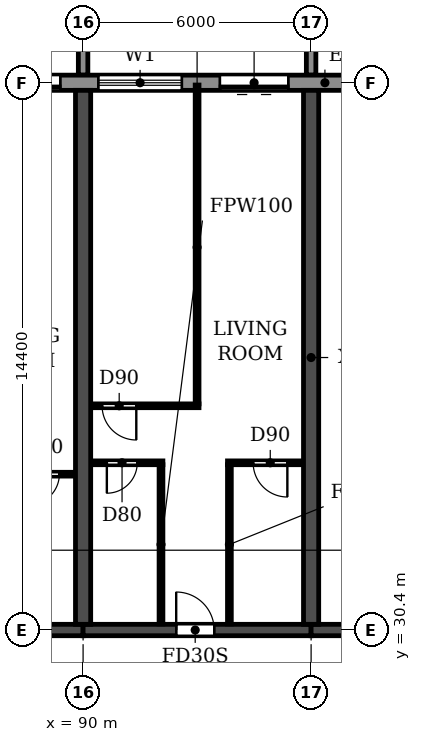
"""IFC4 building model, lengths in metres.
Left out: names, types, materials, properties, quantities, classifications, styles, units other than length and angle.
Written with IfcOpenShell. Run it as: python <this file> out.ifc"""

import sys

from ifc_helpers import new_model, si_unit, direction, frame, frame_2d, origin, place, context, subcontext, project, spatial, polyline, rectangle, outline, extrude, source, transform, mapped, element, fill, save


model = new_model("IFC4")
c1 = context("Model", 3, precision=1e-05, world=origin(), true_north=direction((0.0, 1.0)))
c2 = subcontext(c1, "Body", "Model", "MODEL_VIEW")
j1 = project(units=[si_unit("LENGTHUNIT", "METRE"), si_unit("PLANEANGLEUNIT", "RADIAN")], contexts=[c1])
p1 = place(None, origin())
s1 = spatial("IfcSite", under=j1, at=p1, CompositionType="ELEMENT")
p2 = place(p1, origin())
s2 = spatial("IfcBuilding", under=s1, at=p2, CompositionType="ELEMENT")
p3 = place(p2, frame((0.0, 0.0, 33.3)))
s3 = spatial("IfcBuildingStorey", under=s2, at=p3, CompositionType="ELEMENT", Elevation=33.3)
for number, where, z_axis, x_axis in (
    (1, (90.0, 30.55, 0.0), (0.0, 0.0, 1.0), (0.0, 1.0, 0.0)),
    (2, (96.0, 30.55, 0.0), (0.0, 0.0, 1.0), (0.0, 1.0, 0.0)),
):
    element("IfcWall", number, at=place(p3, frame(where, z_axis=z_axis, x_axis=x_axis)), inside=s3, PredefinedType="SHEAR", context=c2, shape_type="SweptSolid", body=[
        extrude(rectangle(XDim=14.05, YDim=0.4, at=frame_2d((7.025, 0.0))), origin(), (0.0, 0.0, 1.0), 3.05),
    ])
p4 = place(p3, frame((84.0, 30.4, 0.0), z_axis=(0.0, 0.0, 1.0), x_axis=(1.0, 0.0, 0.0)))
e3 = element("IfcWall", 3, at=p4, inside=s3, PredefinedType="SHEAR", context=c2, shape_type="SweptSolid", body=[
    extrude(rectangle(XDim=6.0, YDim=0.3, at=frame_2d((3.0, 0.0))), origin(), (0.0, 0.0, 1.0), 2.45),
])
p5 = place(p4, frame((2.55, 0.0, 0.0)))
e4 = element("IfcOpeningElement", 4, at=p5, cuts=e3, PredefinedType="OPENING", context=c2, shape_type="SweptSolid", body=[
    extrude(rectangle(XDim=1.0, YDim=2.1, at=frame_2d((0.5, 1.05))), frame((0.0, 0.16, 0.0), z_axis=(0.0, -1.0, 0.0), x_axis=(1.0, 0.0, 0.0)), (0.0, 0.0, 1.0), 0.32),
])
p6 = place(p3, frame((90.0, 30.4, 0.0), z_axis=(0.0, 0.0, 1.0), x_axis=(1.0, 0.0, 0.0)))
e5 = element("IfcWall", 5, at=p6, inside=s3, PredefinedType="SHEAR", context=c2, shape_type="SweptSolid", body=[
    extrude(rectangle(XDim=6.0, YDim=0.3, at=frame_2d((3.0, 0.0))), origin(), (0.0, 0.0, 1.0), 2.45),
])
p7 = place(p6, frame((2.45, 0.0, 0.0)))
e6 = element("IfcOpeningElement", 6, at=p7, cuts=e5, PredefinedType="OPENING", context=c2, shape_type="SweptSolid", body=[
    extrude(rectangle(XDim=1.0, YDim=2.1, at=frame_2d((0.5, 1.05))), frame((0.0, 0.16, 0.0), z_axis=(0.0, -1.0, 0.0), x_axis=(1.0, 0.0, 0.0)), (0.0, 0.0, 1.0), 0.32),
])
p8 = place(p3, frame((96.0, 30.4, 0.0), z_axis=(0.0, 0.0, 1.0), x_axis=(1.0, 0.0, 0.0)))
e7 = element("IfcWall", 7, at=p8, inside=s3, PredefinedType="SHEAR", context=c2, shape_type="SweptSolid", body=[
    extrude(rectangle(XDim=5.8, YDim=0.3, at=frame_2d((2.9, 0.0))), origin(), (0.0, 0.0, 1.0), 2.45),
])
p9 = place(p8, frame((2.5, 0.0, 0.0)))
e8 = element("IfcOpeningElement", 8, at=p9, cuts=e7, PredefinedType="OPENING", context=c2, shape_type="SweptSolid", body=[
    extrude(rectangle(XDim=1.0, YDim=2.1, at=frame_2d((0.5, 1.05))), frame((0.0, 0.16, 0.0), z_axis=(0.0, -1.0, 0.0), x_axis=(1.0, 0.0, 0.0)), (0.0, 0.0, 1.0), 0.32),
])
p10 = place(p3, frame((97.317, 44.8, 0.0), z_axis=(0.0, 0.0, 1.0), x_axis=(-1.0, 0.0, 0.0)))
e9 = element("IfcWall", 9, at=p10, inside=s3, PredefinedType="STANDARD", context=c2, shape_type="SweptSolid", body=[
    extrude(rectangle(XDim=92.634, YDim=0.4, at=frame_2d((46.317, 0.0))), origin(), (0.0, 0.0, 1.0), 3.05),
])
p11 = place(p10, frame((88.717, 0.0, 0.9)))
e10 = element("IfcOpeningElement", 10, at=p11, cuts=e9, PredefinedType="OPENING", context=c2, shape_type="SweptSolid", body=[
    extrude(rectangle(XDim=2.2, YDim=1.5, at=frame_2d((1.1, 0.75))), frame((0.0, 0.21, 0.0), z_axis=(0.0, -1.0, 0.0), x_axis=(1.0, 0.0, 0.0)), (0.0, 0.0, 1.0), 0.42),
])
p12 = place(p10, frame((85.917, 0.0, 0.0)))
e11 = element("IfcOpeningElement", 11, at=p12, cuts=e9, PredefinedType="OPENING", context=c2, shape_type="SweptSolid", body=[
    extrude(rectangle(XDim=1.8, YDim=2.4, at=frame_2d((0.9, 1.2))), frame((0.0, 0.21, 0.0), z_axis=(0.0, -1.0, 0.0), x_axis=(1.0, 0.0, 0.0)), (0.0, 0.0, 1.0), 0.42),
])
p13 = place(p10, frame((82.717, 0.0, 0.9)))
e12 = element("IfcOpeningElement", 12, at=p13, cuts=e9, PredefinedType="OPENING", context=c2, shape_type="SweptSolid", body=[
    extrude(rectangle(XDim=2.2, YDim=1.5, at=frame_2d((1.1, 0.75))), frame((0.0, 0.21, 0.0), z_axis=(0.0, -1.0, 0.0), x_axis=(1.0, 0.0, 0.0)), (0.0, 0.0, 1.0), 0.42),
])
p14 = place(p10, frame((79.917, 0.0, 0.0)))
e13 = element("IfcOpeningElement", 13, at=p14, cuts=e9, PredefinedType="OPENING", context=c2, shape_type="SweptSolid", body=[
    extrude(rectangle(XDim=1.8, YDim=2.4, at=frame_2d((0.9, 1.2))), frame((0.0, 0.21, 0.0), z_axis=(0.0, -1.0, 0.0), x_axis=(1.0, 0.0, 0.0)), (0.0, 0.0, 1.0), 0.42),
])
p15 = place(p10, frame((76.717, 0.0, 0.9)))
e14 = element("IfcOpeningElement", 14, at=p15, cuts=e9, PredefinedType="OPENING", context=c2, shape_type="SweptSolid", body=[
    extrude(rectangle(XDim=2.2, YDim=1.5, at=frame_2d((1.1, 0.75))), frame((0.0, 0.21, 0.0), z_axis=(0.0, -1.0, 0.0), x_axis=(1.0, 0.0, 0.0)), (0.0, 0.0, 1.0), 0.42),
])
p16 = place(p10, frame((73.717, 0.0, 0.9)))
e15 = element("IfcOpeningElement", 15, at=p16, cuts=e9, PredefinedType="OPENING", context=c2, shape_type="SweptSolid", body=[
    extrude(rectangle(XDim=2.2, YDim=1.5, at=frame_2d((1.1, 0.75))), frame((0.0, 0.21, 0.0), z_axis=(0.0, -1.0, 0.0), x_axis=(1.0, 0.0, 0.0)), (0.0, 0.0, 1.0), 0.42),
])
p17 = place(p10, frame((70.717, 0.0, 0.9)))
e16 = element("IfcOpeningElement", 16, at=p17, cuts=e9, PredefinedType="OPENING", context=c2, shape_type="SweptSolid", body=[
    extrude(rectangle(XDim=2.2, YDim=1.5, at=frame_2d((1.1, 0.75))), frame((0.0, 0.21, 0.0), z_axis=(0.0, -1.0, 0.0), x_axis=(1.0, 0.0, 0.0)), (0.0, 0.0, 1.0), 0.42),
])
p18 = place(p10, frame((67.917, 0.0, 0.0)))
e17 = element("IfcOpeningElement", 17, at=p18, cuts=e9, PredefinedType="OPENING", context=c2, shape_type="SweptSolid", body=[
    extrude(rectangle(XDim=1.8, YDim=2.4, at=frame_2d((0.9, 1.2))), frame((0.0, 0.21, 0.0), z_axis=(0.0, -1.0, 0.0), x_axis=(1.0, 0.0, 0.0)), (0.0, 0.0, 1.0), 0.42),
])
p19 = place(p10, frame((64.717, 0.0, 0.9)))
e18 = element("IfcOpeningElement", 18, at=p19, cuts=e9, PredefinedType="OPENING", context=c2, shape_type="SweptSolid", body=[
    extrude(rectangle(XDim=2.2, YDim=1.5, at=frame_2d((1.1, 0.75))), frame((0.0, 0.21, 0.0), z_axis=(0.0, -1.0, 0.0), x_axis=(1.0, 0.0, 0.0)), (0.0, 0.0, 1.0), 0.42),
])
p20 = place(p10, frame((61.717, 0.0, 0.9)))
e19 = element("IfcOpeningElement", 19, at=p20, cuts=e9, PredefinedType="OPENING", context=c2, shape_type="SweptSolid", body=[
    extrude(rectangle(XDim=2.2, YDim=1.5, at=frame_2d((1.1, 0.75))), frame((0.0, 0.21, 0.0), z_axis=(0.0, -1.0, 0.0), x_axis=(1.0, 0.0, 0.0)), (0.0, 0.0, 1.0), 0.42),
])
p21 = place(p10, frame((58.717, 0.0, 0.9)))
e20 = element("IfcOpeningElement", 20, at=p21, cuts=e9, PredefinedType="OPENING", context=c2, shape_type="SweptSolid", body=[
    extrude(rectangle(XDim=2.2, YDim=1.5, at=frame_2d((1.1, 0.75))), frame((0.0, 0.21, 0.0), z_axis=(0.0, -1.0, 0.0), x_axis=(1.0, 0.0, 0.0)), (0.0, 0.0, 1.0), 0.42),
])
p22 = place(p10, frame((55.917, 0.0, 0.0)))
e21 = element("IfcOpeningElement", 21, at=p22, cuts=e9, PredefinedType="OPENING", context=c2, shape_type="SweptSolid", body=[
    extrude(rectangle(XDim=1.8, YDim=2.4, at=frame_2d((0.9, 1.2))), frame((0.0, 0.21, 0.0), z_axis=(0.0, -1.0, 0.0), x_axis=(1.0, 0.0, 0.0)), (0.0, 0.0, 1.0), 0.42),
])
p23 = place(p10, frame((52.717, 0.0, 0.9)))
e22 = element("IfcOpeningElement", 22, at=p23, cuts=e9, PredefinedType="OPENING", context=c2, shape_type="SweptSolid", body=[
    extrude(rectangle(XDim=2.2, YDim=1.5, at=frame_2d((1.1, 0.75))), frame((0.0, 0.21, 0.0), z_axis=(0.0, -1.0, 0.0), x_axis=(1.0, 0.0, 0.0)), (0.0, 0.0, 1.0), 0.42),
])
p24 = place(p10, frame((49.717, 0.0, 0.9)))
e23 = element("IfcOpeningElement", 23, at=p24, cuts=e9, PredefinedType="OPENING", context=c2, shape_type="SweptSolid", body=[
    extrude(rectangle(XDim=2.2, YDim=1.5, at=frame_2d((1.1, 0.75))), frame((0.0, 0.21, 0.0), z_axis=(0.0, -1.0, 0.0), x_axis=(1.0, 0.0, 0.0)), (0.0, 0.0, 1.0), 0.42),
])
p25 = place(p10, frame((46.717, 0.0, 0.9)))
e24 = element("IfcOpeningElement", 24, at=p25, cuts=e9, PredefinedType="OPENING", context=c2, shape_type="SweptSolid", body=[
    extrude(rectangle(XDim=2.2, YDim=1.5, at=frame_2d((1.1, 0.75))), frame((0.0, 0.21, 0.0), z_axis=(0.0, -1.0, 0.0), x_axis=(1.0, 0.0, 0.0)), (0.0, 0.0, 1.0), 0.42),
])
p26 = place(p10, frame((43.917, 0.0, 0.0)))
e25 = element("IfcOpeningElement", 25, at=p26, cuts=e9, PredefinedType="OPENING", context=c2, shape_type="SweptSolid", body=[
    extrude(rectangle(XDim=1.8, YDim=2.4, at=frame_2d((0.9, 1.2))), frame((0.0, 0.21, 0.0), z_axis=(0.0, -1.0, 0.0), x_axis=(1.0, 0.0, 0.0)), (0.0, 0.0, 1.0), 0.42),
])
p27 = place(p10, frame((40.717, 0.0, 0.9)))
e26 = element("IfcOpeningElement", 26, at=p27, cuts=e9, PredefinedType="OPENING", context=c2, shape_type="SweptSolid", body=[
    extrude(rectangle(XDim=2.2, YDim=1.5, at=frame_2d((1.1, 0.75))), frame((0.0, 0.21, 0.0), z_axis=(0.0, -1.0, 0.0), x_axis=(1.0, 0.0, 0.0)), (0.0, 0.0, 1.0), 0.42),
])
p28 = place(p10, frame((37.717, 0.0, 0.9)))
e27 = element("IfcOpeningElement", 27, at=p28, cuts=e9, PredefinedType="OPENING", context=c2, shape_type="SweptSolid", body=[
    extrude(rectangle(XDim=2.2, YDim=1.5, at=frame_2d((1.1, 0.75))), frame((0.0, 0.21, 0.0), z_axis=(0.0, -1.0, 0.0), x_axis=(1.0, 0.0, 0.0)), (0.0, 0.0, 1.0), 0.42),
])
p29 = place(p10, frame((34.717, 0.0, 0.9)))
e28 = element("IfcOpeningElement", 28, at=p29, cuts=e9, PredefinedType="OPENING", context=c2, shape_type="SweptSolid", body=[
    extrude(rectangle(XDim=2.2, YDim=1.5, at=frame_2d((1.1, 0.75))), frame((0.0, 0.21, 0.0), z_axis=(0.0, -1.0, 0.0), x_axis=(1.0, 0.0, 0.0)), (0.0, 0.0, 1.0), 0.42),
])
p30 = place(p10, frame((31.917, 0.0, 0.0)))
e29 = element("IfcOpeningElement", 29, at=p30, cuts=e9, PredefinedType="OPENING", context=c2, shape_type="SweptSolid", body=[
    extrude(rectangle(XDim=1.8, YDim=2.4, at=frame_2d((0.9, 1.2))), frame((0.0, 0.21, 0.0), z_axis=(0.0, -1.0, 0.0), x_axis=(1.0, 0.0, 0.0)), (0.0, 0.0, 1.0), 0.42),
])
p31 = place(p10, frame((28.717, 0.0, 0.9)))
e30 = element("IfcOpeningElement", 30, at=p31, cuts=e9, PredefinedType="OPENING", context=c2, shape_type="SweptSolid", body=[
    extrude(rectangle(XDim=2.2, YDim=1.5, at=frame_2d((1.1, 0.75))), frame((0.0, 0.21, 0.0), z_axis=(0.0, -1.0, 0.0), x_axis=(1.0, 0.0, 0.0)), (0.0, 0.0, 1.0), 0.42),
])
p32 = place(p10, frame((25.717, 0.0, 0.9)))
e31 = element("IfcOpeningElement", 31, at=p32, cuts=e9, PredefinedType="OPENING", context=c2, shape_type="SweptSolid", body=[
    extrude(rectangle(XDim=2.2, YDim=1.5, at=frame_2d((1.1, 0.75))), frame((0.0, 0.21, 0.0), z_axis=(0.0, -1.0, 0.0), x_axis=(1.0, 0.0, 0.0)), (0.0, 0.0, 1.0), 0.42),
])
p33 = place(p10, frame((22.917, 0.0, 0.0)))
e32 = element("IfcOpeningElement", 32, at=p33, cuts=e9, PredefinedType="OPENING", context=c2, shape_type="SweptSolid", body=[
    extrude(rectangle(XDim=1.8, YDim=2.4, at=frame_2d((0.9, 1.2))), frame((0.0, 0.21, 0.0), z_axis=(0.0, -1.0, 0.0), x_axis=(1.0, 0.0, 0.0)), (0.0, 0.0, 1.0), 0.42),
])
p34 = place(p10, frame((19.717, 0.0, 0.9)))
e33 = element("IfcOpeningElement", 33, at=p34, cuts=e9, PredefinedType="OPENING", context=c2, shape_type="SweptSolid", body=[
    extrude(rectangle(XDim=2.2, YDim=1.5, at=frame_2d((1.1, 0.75))), frame((0.0, 0.21, 0.0), z_axis=(0.0, -1.0, 0.0), x_axis=(1.0, 0.0, 0.0)), (0.0, 0.0, 1.0), 0.42),
])
p35 = place(p10, frame((16.717, 0.0, 0.9)))
e34 = element("IfcOpeningElement", 34, at=p35, cuts=e9, PredefinedType="OPENING", context=c2, shape_type="SweptSolid", body=[
    extrude(rectangle(XDim=2.2, YDim=1.5, at=frame_2d((1.1, 0.75))), frame((0.0, 0.21, 0.0), z_axis=(0.0, -1.0, 0.0), x_axis=(1.0, 0.0, 0.0)), (0.0, 0.0, 1.0), 0.42),
])
p36 = place(p10, frame((13.917, 0.0, 0.0)))
e35 = element("IfcOpeningElement", 35, at=p36, cuts=e9, PredefinedType="OPENING", context=c2, shape_type="SweptSolid", body=[
    extrude(rectangle(XDim=1.8, YDim=2.4, at=frame_2d((0.9, 1.2))), frame((0.0, 0.21, 0.0), z_axis=(0.0, -1.0, 0.0), x_axis=(1.0, 0.0, 0.0)), (0.0, 0.0, 1.0), 0.42),
])
p37 = place(p10, frame((10.717, 0.0, 0.9)))
e36 = element("IfcOpeningElement", 36, at=p37, cuts=e9, PredefinedType="OPENING", context=c2, shape_type="SweptSolid", body=[
    extrude(rectangle(XDim=2.2, YDim=1.5, at=frame_2d((1.1, 0.75))), frame((0.0, 0.21, 0.0), z_axis=(0.0, -1.0, 0.0), x_axis=(1.0, 0.0, 0.0)), (0.0, 0.0, 1.0), 0.42),
])
p38 = place(p10, frame((7.917, 0.0, 0.0)))
e37 = element("IfcOpeningElement", 37, at=p38, cuts=e9, PredefinedType="OPENING", context=c2, shape_type="SweptSolid", body=[
    extrude(rectangle(XDim=1.8, YDim=2.4, at=frame_2d((0.9, 1.2))), frame((0.0, 0.21, 0.0), z_axis=(0.0, -1.0, 0.0), x_axis=(1.0, 0.0, 0.0)), (0.0, 0.0, 1.0), 0.42),
])
p39 = place(p10, frame((4.717, 0.0, 0.9)))
e38 = element("IfcOpeningElement", 38, at=p39, cuts=e9, PredefinedType="OPENING", context=c2, shape_type="SweptSolid", body=[
    extrude(rectangle(XDim=2.2, YDim=1.5, at=frame_2d((1.1, 0.75))), frame((0.0, 0.21, 0.0), z_axis=(0.0, -1.0, 0.0), x_axis=(1.0, 0.0, 0.0)), (0.0, 0.0, 1.0), 0.42),
])
p40 = place(p10, frame((1.917, 0.0, 0.0)))
e39 = element("IfcOpeningElement", 39, at=p40, cuts=e9, PredefinedType="OPENING", context=c2, shape_type="SweptSolid", body=[
    extrude(rectangle(XDim=1.8, YDim=2.4, at=frame_2d((0.9, 1.2))), frame((0.0, 0.21, 0.0), z_axis=(0.0, -1.0, 0.0), x_axis=(1.0, 0.0, 0.0)), (0.0, 0.0, 1.0), 0.42),
])
m1 = source(origin(), c2, "Body", "SweptSolid", [
    extrude(outline(polyline([(0.0, 0.0), (0.25, 0.0), (0.25, 3.1), (0.0, 3.1), (0.0, 0.0)])), origin(), (0.0, 0.0, 1.0), 3.1),
])
for number, where in (
    (40, (89.875, 45.0, 0.0)),
    (41, (95.875, 45.0, 0.0)),
):
    element("IfcWall", number, at=place(p3, frame(where)), inside=s3, PredefinedType="STANDARD", context=c2, shape_type="MappedRepresentation", body=[
        mapped(m1, transform((0.0, 0.0, 0.0))),
    ])
p41 = place(p3, frame((87.9, 34.5, 0.0), z_axis=(0.0, 0.0, 1.0), x_axis=(1.0, 0.0, 0.0)))
e42 = element("IfcWall", 42, at=p41, inside=s3, PredefinedType="PARTITIONING", context=c2, shape_type="SweptSolid", body=[
    extrude(rectangle(XDim=1.89, YDim=0.1, at=frame_2d((0.945, 0.0))), origin(), (0.0, 0.0, 1.0), 3.05),
])
p42 = place(p41, frame((0.675, 0.0, 0.0)))
e43 = element("IfcOpeningElement", 43, at=p42, cuts=e42, PredefinedType="OPENING", context=c2, shape_type="SweptSolid", body=[
    extrude(rectangle(XDim=0.8, YDim=2.1, at=frame_2d((0.4, 1.05))), frame((0.0, 0.06, 0.0), z_axis=(0.0, -1.0, 0.0), x_axis=(1.0, 0.0, 0.0)), (0.0, 0.0, 1.0), 0.12),
])
p43 = place(p3, frame((90.21, 34.8, 0.0), z_axis=(0.0, 0.0, 1.0), x_axis=(1.0, 0.0, 0.0)))
e44 = element("IfcWall", 44, at=p43, inside=s3, PredefinedType="PARTITIONING", context=c2, shape_type="SweptSolid", body=[
    extrude(rectangle(XDim=1.89, YDim=0.1, at=frame_2d((0.945, 0.0))), origin(), (0.0, 0.0, 1.0), 3.05),
])
p44 = place(p43, frame((0.415, 0.0, 0.0)))
e45 = element("IfcOpeningElement", 45, at=p44, cuts=e44, PredefinedType="OPENING", context=c2, shape_type="SweptSolid", body=[
    extrude(rectangle(XDim=0.8, YDim=2.1, at=frame_2d((0.4, 1.05))), frame((0.0, 0.06, 0.0), z_axis=(0.0, -1.0, 0.0), x_axis=(1.0, 0.0, 0.0)), (0.0, 0.0, 1.0), 0.12),
])
p45 = place(p3, frame((93.8, 34.8, 0.0), z_axis=(0.0, 0.0, 1.0), x_axis=(1.0, 0.0, 0.0)))
e46 = element("IfcWall", 46, at=p45, inside=s3, PredefinedType="PARTITIONING", context=c2, shape_type="SweptSolid", body=[
    extrude(rectangle(XDim=1.99, YDim=0.1, at=frame_2d((0.995, 0.0))), origin(), (0.0, 0.0, 1.0), 3.05),
])
p46 = place(p45, frame((0.675, 0.0, 0.0)))
e47 = element("IfcOpeningElement", 47, at=p46, cuts=e46, PredefinedType="OPENING", context=c2, shape_type="SweptSolid", body=[
    extrude(rectangle(XDim=0.9, YDim=2.1, at=frame_2d((0.45, 1.05))), frame((0.0, 0.06, 0.0), z_axis=(0.0, -1.0, 0.0), x_axis=(1.0, 0.0, 0.0)), (0.0, 0.0, 1.0), 0.12),
])
p47 = place(p3, frame((90.21, 36.3, 0.0), z_axis=(0.0, 0.0, 1.0), x_axis=(1.0, 0.0, 0.0)))
e48 = element("IfcWall", 48, at=p47, inside=s3, PredefinedType="PARTITIONING", context=c2, shape_type="SweptSolid", body=[
    extrude(rectangle(XDim=2.84, YDim=0.1, at=frame_2d((1.42, 0.0))), origin(), (0.0, 0.0, 1.0), 3.05),
])
p48 = place(p47, frame((0.29, 0.0, 0.0)))
e49 = element("IfcOpeningElement", 49, at=p48, cuts=e48, PredefinedType="OPENING", context=c2, shape_type="SweptSolid", body=[
    extrude(rectangle(XDim=0.9, YDim=2.1, at=frame_2d((0.45, 1.05))), frame((0.0, 0.06, 0.0), z_axis=(0.0, -1.0, 0.0), x_axis=(1.0, 0.0, 0.0)), (0.0, 0.0, 1.0), 0.12),
])
p49 = place(p3, frame((92.05, 30.56, 0.0), z_axis=(0.0, 0.0, 1.0), x_axis=(0.0, 1.0, 0.0)))
e50 = element("IfcWall", 50, at=p49, inside=s3, PredefinedType="PARTITIONING", context=c2, shape_type="SweptSolid", body=[
    extrude(rectangle(XDim=4.19, YDim=0.1, at=frame_2d((2.095, 0.0))), origin(), (0.0, 0.0, 1.0), 3.05),
])
p50 = place(p3, frame((93.0, 36.35, 0.0), z_axis=(0.0, 0.0, 1.0), x_axis=(0.0, 1.0, 0.0)))
e51 = element("IfcWall", 51, at=p50, inside=s3, PredefinedType="PARTITIONING", context=c2, shape_type="SweptSolid", body=[
    extrude(rectangle(XDim=8.39, YDim=0.1, at=frame_2d((4.195, 0.0))), origin(), (0.0, 0.0, 1.0), 3.05),
])
p51 = place(p3, frame((93.85, 30.56, 0.0), z_axis=(0.0, 0.0, 1.0), x_axis=(0.0, 1.0, 0.0)))
e52 = element("IfcWall", 52, at=p51, inside=s3, PredefinedType="PARTITIONING", context=c2, shape_type="SweptSolid", body=[
    extrude(rectangle(XDim=4.19, YDim=0.1, at=frame_2d((2.095, 0.0))), origin(), (0.0, 0.0, 1.0), 3.05),
])
p52 = place(p38, origin())
e53 = element("IfcDoor", 53, at=p52, inside=s3, OperationType="DOUBLE_DOOR_SLIDING", PredefinedType="DOOR", context=c2, shape_type="SweptSolid", body=[
    extrude(rectangle(XDim=1.8, YDim=2.4, at=frame_2d((0.9, 1.2))), frame((0.0, 0.025, 0.0), z_axis=(0.0, -1.0, 0.0), x_axis=(1.0, 0.0, 0.0)), (0.0, 0.0, 1.0), 0.05),
])
fill(e37, e53)
p53 = place(p39, origin())
e54 = element("IfcWindow", 54, at=p53, inside=s3, PartitioningType="DOUBLE_PANEL_HORIZONTAL", PredefinedType="WINDOW", context=c2, shape_type="SweptSolid", body=[
    extrude(rectangle(XDim=2.2, YDim=1.5, at=frame_2d((1.1, 0.75))), frame((0.0, 0.03, 0.0), z_axis=(0.0, -1.0, 0.0), x_axis=(1.0, 0.0, 0.0)), (0.0, 0.0, 1.0), 0.06),
])
fill(e38, e54)
p54 = place(p40, origin())
e55 = element("IfcDoor", 55, at=p54, inside=s3, OperationType="DOUBLE_DOOR_SLIDING", PredefinedType="DOOR", context=c2, shape_type="SweptSolid", body=[
    extrude(rectangle(XDim=1.8, YDim=2.4, at=frame_2d((0.9, 1.2))), frame((0.0, 0.025, 0.0), z_axis=(0.0, -1.0, 0.0), x_axis=(1.0, 0.0, 0.0)), (0.0, 0.0, 1.0), 0.05),
])
fill(e39, e55)
p55 = place(p42, frame((0.8, 0.0, 0.0), z_axis=(0.0, 0.0, 1.0), x_axis=(-1.0, 0.0, 0.0)))
e56 = element("IfcDoor", 56, at=p55, inside=s3, OperationType="SINGLE_SWING_RIGHT", PredefinedType="DOOR", context=c2, shape_type="SweptSolid", body=[
    extrude(rectangle(XDim=0.8, YDim=2.1, at=frame_2d((0.4, 1.05))), frame((0.0, 0.025, 0.0), z_axis=(0.0, -1.0, 0.0), x_axis=(1.0, 0.0, 0.0)), (0.0, 0.0, 1.0), 0.05),
])
fill(e43, e56)
p56 = place(p48, frame((0.9, 0.0, 0.0), z_axis=(0.0, 0.0, 1.0), x_axis=(-1.0, 0.0, 0.0)))
e57 = element("IfcDoor", 57, at=p56, inside=s3, OperationType="SINGLE_SWING_LEFT", PredefinedType="DOOR", context=c2, shape_type="SweptSolid", body=[
    extrude(rectangle(XDim=0.9, YDim=2.1, at=frame_2d((0.45, 1.05))), frame((0.0, 0.025, 0.0), z_axis=(0.0, -1.0, 0.0), x_axis=(1.0, 0.0, 0.0)), (0.0, 0.0, 1.0), 0.05),
])
fill(e49, e57)
p57 = place(p44, frame((0.8, 0.0, 0.0), z_axis=(0.0, 0.0, 1.0), x_axis=(-1.0, 0.0, 0.0)))
e58 = element("IfcDoor", 58, at=p57, inside=s3, OperationType="SINGLE_SWING_RIGHT", PredefinedType="DOOR", context=c2, shape_type="SweptSolid", body=[
    extrude(rectangle(XDim=0.8, YDim=2.1, at=frame_2d((0.4, 1.05))), frame((0.0, 0.025, 0.0), z_axis=(0.0, -1.0, 0.0), x_axis=(1.0, 0.0, 0.0)), (0.0, 0.0, 1.0), 0.05),
])
fill(e45, e58)
p58 = place(p7, origin())
e59 = element("IfcDoor", 59, at=p58, inside=s3, OperationType="SINGLE_SWING_LEFT", PredefinedType="DOOR", context=c2, shape_type="SweptSolid", body=[
    extrude(rectangle(XDim=1.0, YDim=2.1, at=frame_2d((0.5, 1.05))), frame((0.0, 0.025, 0.0), z_axis=(0.0, -1.0, 0.0), x_axis=(1.0, 0.0, 0.0)), (0.0, 0.0, 1.0), 0.05),
])
fill(e6, e59)
p59 = place(p46, frame((0.9, 0.0, 0.0), z_axis=(0.0, 0.0, 1.0), x_axis=(-1.0, 0.0, 0.0)))
e60 = element("IfcDoor", 60, at=p59, inside=s3, OperationType="SINGLE_SWING_LEFT", PredefinedType="DOOR", context=c2, shape_type="SweptSolid", body=[
    extrude(rectangle(XDim=0.9, YDim=2.1, at=frame_2d((0.45, 1.05))), frame((0.0, 0.025, 0.0), z_axis=(0.0, -1.0, 0.0), x_axis=(1.0, 0.0, 0.0)), (0.0, 0.0, 1.0), 0.05),
])
fill(e47, e60)
save(model, sys.argv[1])
